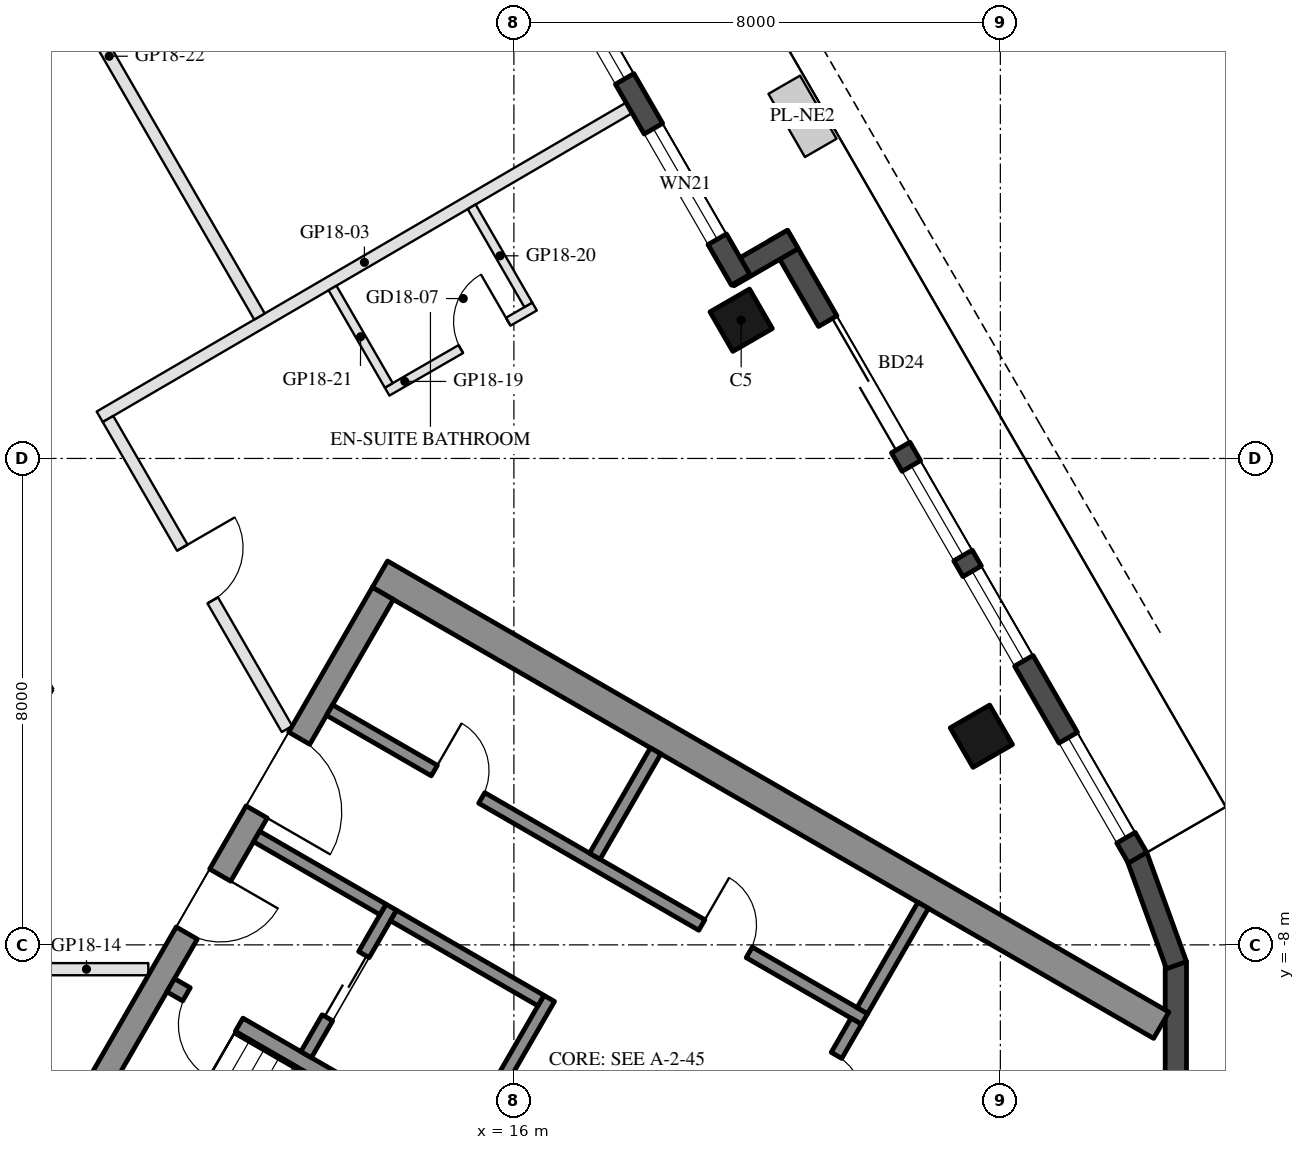
"""IFC4 building model, lengths in metres.
Left out: names, types, materials, properties, quantities, classifications, styles, units other than length and angle.
Written with IfcOpenShell. Run it as: python <this file> out.ifc"""

import sys

from ifc_helpers import new_model, si_unit, direction, frame, frame_2d, origin, origin_2d, place, context, subcontext, project, spatial, rectangle, hollow_rectangle, extrude, element, fill, save


model = new_model("IFC4")
c1 = context("Model", 3, precision=1e-05, world=origin(), true_north=direction((0.0, 1.0)))
c2 = subcontext(c1, "Body", "Model", "MODEL_VIEW")
j1 = project(units=[si_unit("LENGTHUNIT", "METRE"), si_unit("PLANEANGLEUNIT", "RADIAN")], contexts=[c1])
p1 = place(None, origin())
s1 = spatial("IfcSite", under=j1, at=p1, CompositionType="ELEMENT")
p2 = place(p1, origin())
s2 = spatial("IfcBuilding", under=s1, at=p2, CompositionType="ELEMENT")
p3 = place(p2, frame((0.0, 0.0, 191.0)))
s3 = spatial("IfcBuildingStorey", under=s2, at=p3, CompositionType="ELEMENT", Elevation=191.0)
for number, where, z_axis, x_axis in (
    (1, (23.688, -4.568, 0.0), (0.0, 0.0, 1.0), (-0.5, 0.866, 0.0)),
    (2, (19.738, 2.273, 0.0), (0.0, 0.0, 1.0), (-0.5, 0.866, 0.0)),
):
    element("IfcColumn", number, at=place(p3, frame(where, z_axis=z_axis, x_axis=x_axis)), inside=s3, PredefinedType="COLUMN", context=c2, shape_type="SweptSolid", body=[
        extrude(hollow_rectangle(XDim=0.75, YDim=0.75, WallThickness=0.035, at=origin_2d()), origin(), (0.0, 0.0, 1.0), 3.7),
    ])
for number, where, z_axis, x_axis in (
    (3, (26.244, -11.92, 0.0), (0.0, 0.0, 1.0), (0.342, 0.94, 0.0)),
    (4, (26.886, -10.185, 0.0), (0.0, 0.0, 1.0), (0.0, 1.0, 0.0)),
    (5, (26.897, -8.335, 0.0), (0.0, 0.0, 1.0), (-0.342, 0.94, 0.0)),
):
    element("IfcWall", number, at=place(p3, frame(where, z_axis=z_axis, x_axis=x_axis)), inside=s3, PredefinedType="SOLIDWALL", context=c2, shape_type="SweptSolid", body=[
        extrude(rectangle(XDim=1.91, YDim=0.35, at=frame_2d((0.955, 0.0))), origin(), (0.0, 0.0, 1.0), 3.55),
    ])
p4 = place(p3, frame((26.257, -6.567, 0.0), z_axis=(0.0, 0.0, 1.0), x_axis=(-0.500023526245, 0.866011820475, 0.0)))
e6 = element("IfcWall", 6, at=p4, inside=s3, PredefinedType="SOLIDWALL", context=c2, shape_type="SweptSolid", body=[
    extrude(rectangle(XDim=11.816, YDim=0.35, at=frame_2d((5.908, 0.0))), origin(), (0.0, 0.0, 1.0), 3.55),
])
p5 = place(p4, frame((0.38, 0.0, 0.3)))
e7 = element("IfcOpeningElement", 7, at=p5, cuts=e6, PredefinedType="OPENING", context=c2, shape_type="SweptSolid", body=[
    extrude(rectangle(XDim=1.9, YDim=2.65, at=frame_2d((0.95, 1.325))), frame((0.0, 0.185, 0.0), z_axis=(0.0, -1.0, 0.0), x_axis=(1.0, 0.0, 0.0)), (0.0, 0.0, 1.0), 0.37),
])
p6 = place(p4, frame((7.791, 0.0, 0.0)))
e8 = element("IfcOpeningElement", 8, at=p6, cuts=e6, PredefinedType="OPENING", context=c2, shape_type="SweptSolid", body=[
    extrude(rectangle(XDim=2.4, YDim=2.4, at=frame_2d((1.2, 1.2))), frame((0.0, 0.185, 0.0), z_axis=(0.0, -1.0, 0.0), x_axis=(1.0, 0.0, 0.0)), (0.0, 0.0, 1.0), 0.37),
])
p7 = place(p4, frame((3.741, 0.0, 0.3)))
e9 = element("IfcOpeningElement", 9, at=p7, cuts=e6, PredefinedType="OPENING", context=c2, shape_type="SweptSolid", body=[
    extrude(rectangle(XDim=1.7, YDim=2.65, at=frame_2d((0.85, 1.325))), frame((0.0, 0.185, 0.0), z_axis=(0.0, -1.0, 0.0), x_axis=(1.0, 0.0, 0.0)), (0.0, 0.0, 1.0), 0.37),
])
p8 = place(p4, frame((5.741, 0.0, 0.3)))
e10 = element("IfcOpeningElement", 10, at=p8, cuts=e6, PredefinedType="OPENING", context=c2, shape_type="SweptSolid", body=[
    extrude(rectangle(XDim=1.7, YDim=2.65, at=frame_2d((0.85, 1.325))), frame((0.0, 0.185, 0.0), z_axis=(0.0, -1.0, 0.0), x_axis=(1.0, 0.0, 0.0)), (0.0, 0.0, 1.0), 0.37),
])
p9 = place(p3, frame((20.588, 3.601, 0.0), z_axis=(0.0, 0.0, 1.0), x_axis=(-0.866005645448, -0.500034220881, 0.0)))
e11 = element("IfcWall", 11, at=p9, inside=s3, PredefinedType="SOLIDWALL", context=c2, shape_type="SweptSolid", body=[
    extrude(rectangle(XDim=1.22, YDim=0.35, at=frame_2d((0.61, 0.0))), origin(), (0.0, 0.0, 1.0), 3.55),
])
p10 = place(p3, frame((19.729, 2.938, 0.0), z_axis=(0.0, 0.0, 1.0), x_axis=(-0.499976430342, 0.866039011305, 0.0)))
e12 = element("IfcWall", 12, at=p10, inside=s3, PredefinedType="SOLIDWALL", context=c2, shape_type="SweptSolid", body=[
    extrude(rectangle(XDim=6.74, YDim=0.35, at=frame_2d((3.37, 0.0))), origin(), (0.0, 0.0, 1.0), 3.55),
])
p11 = place(p10, frame((0.77, 0.0, 0.3)))
e13 = element("IfcOpeningElement", 13, at=p11, cuts=e12, PredefinedType="OPENING", context=c2, shape_type="SweptSolid", body=[
    extrude(rectangle(XDim=2.1, YDim=2.65, at=frame_2d((1.05, 1.325))), frame((0.0, 0.185, 0.0), z_axis=(0.0, -1.0, 0.0), x_axis=(1.0, 0.0, 0.0)), (0.0, 0.0, 1.0), 0.37),
])
p12 = place(p10, frame((3.815, 0.0, 0.3)))
e14 = element("IfcOpeningElement", 14, at=p12, cuts=e12, PredefinedType="OPENING", context=c2, shape_type="SweptSolid", body=[
    extrude(rectangle(XDim=2.1, YDim=2.65, at=frame_2d((1.05, 1.325))), frame((0.0, 0.185, 0.0), z_axis=(0.0, -1.0, 0.0), x_axis=(1.0, 0.0, 0.0)), (0.0, 0.0, 1.0), 0.37),
])
p13 = place(p3, frame((13.797, -1.903, 0.0), z_axis=(0.0, 0.0, 1.0), x_axis=(0.866025009528, -0.500000682871, 0.0)))
e15 = element("IfcWall", 15, at=p13, inside=s3, PredefinedType="SHEAR", context=c2, shape_type="SweptSolid", body=[
    extrude(rectangle(XDim=14.837, YDim=0.5, at=frame_2d((7.418, 0.0))), origin(), (0.0, 0.0, 1.0), 3.5),
])
p14 = place(p3, frame((8.845, -10.88, 0.0), z_axis=(0.0, 0.0, 1.0), x_axis=(0.500004234368, 0.866022959057, 0.0)))
e16 = element("IfcWall", 16, at=p14, inside=s3, PredefinedType="SHEAR", context=c2, shape_type="SweptSolid", body=[
    extrude(rectangle(XDim=10.0, YDim=0.4, at=frame_2d((5.0, 0.0))), origin(), (0.0, 0.0, 1.0), 3.5),
])
p15 = place(p14, frame((3.55, 0.0, 0.0)))
e17 = element("IfcOpeningElement", 17, at=p15, cuts=e16, PredefinedType="OPENING", context=c2, shape_type="SweptSolid", body=[
    extrude(rectangle(XDim=1.1, YDim=2.1, at=frame_2d((0.55, 1.05))), frame((0.0, 0.21, 0.0), z_axis=(0.0, -1.0, 0.0), x_axis=(1.0, 0.0, 0.0)), (0.0, 0.0, 1.0), 0.42),
])
p16 = place(p14, frame((5.85, 0.0, 0.0)))
e18 = element("IfcOpeningElement", 18, at=p16, cuts=e16, PredefinedType="OPENING", context=c2, shape_type="SweptSolid", body=[
    extrude(rectangle(XDim=1.4, YDim=2.1, at=frame_2d((0.7, 1.05))), frame((0.0, 0.21, 0.0), z_axis=(0.0, -1.0, 0.0), x_axis=(1.0, 0.0, 0.0)), (0.0, 0.0, 1.0), 0.42),
])
p17 = place(p3, frame((10.356, -8.664, 0.0), z_axis=(0.0, 0.0, 1.0), x_axis=(0.866028629588, -0.499994412703, 0.0)))
e19 = element("IfcWall", 19, at=p17, inside=s3, PredefinedType="SHEAR", context=c2, shape_type="SweptSolid", body=[
    extrude(rectangle(XDim=6.45, YDim=0.25, at=frame_2d((3.225, 0.0))), origin(), (0.0, 0.0, 1.0), 3.5),
])
p18 = place(p17, frame((0.3, 0.0, 0.0)))
e20 = element("IfcOpeningElement", 20, at=p18, cuts=e19, PredefinedType="OPENING", context=c2, shape_type="SweptSolid", body=[
    extrude(rectangle(XDim=1.0, YDim=2.1, at=frame_2d((0.5, 1.05))), frame((0.0, 0.135, 0.0), z_axis=(0.0, -1.0, 0.0), x_axis=(1.0, 0.0, 0.0)), (0.0, 0.0, 1.0), 0.27),
])
p19 = place(p3, frame((15.181, -11.305, 0.0), z_axis=(0.0, 0.0, 1.0), x_axis=(0.49994636267, 0.866056369097, 0.0)))
e21 = element("IfcWall", 21, at=p19, inside=s3, PredefinedType="SHEAR", context=c2, shape_type="SweptSolid", body=[
    extrude(rectangle(XDim=2.8, YDim=0.2, at=frame_2d((1.4, 0.0))), origin(), (0.0, 0.0, 1.0), 3.5),
])
p20 = place(p3, frame((12.583, -9.805, 0.0), z_axis=(0.0, 0.0, 1.0), x_axis=(0.49994636267, 0.866056369097, 0.0)))
e22 = element("IfcWall", 22, at=p20, inside=s3, PredefinedType="SHEAR", context=c2, shape_type="SweptSolid", body=[
    extrude(rectangle(XDim=2.8, YDim=0.2, at=frame_2d((1.4, 0.0))), origin(), (0.0, 0.0, 1.0), 3.5),
])
p21 = place(p20, frame((0.7, 0.0, 0.0)))
e23 = element("IfcOpeningElement", 23, at=p21, cuts=e22, PredefinedType="OPENING", context=c2, shape_type="SweptSolid", body=[
    extrude(rectangle(XDim=1.2, YDim=2.1, at=frame_2d((0.6, 1.05))), frame((0.0, 0.11, 0.0), z_axis=(0.0, -1.0, 0.0), x_axis=(1.0, 0.0, 0.0)), (0.0, 0.0, 1.0), 0.22),
])
p22 = place(p3, frame((11.768, -6.217, 0.0), z_axis=(0.0, 0.0, 1.0), x_axis=(0.866050077142, -0.499957262057, 0.0)))
e24 = element("IfcWall", 24, at=p22, inside=s3, PredefinedType="SHEAR", context=c2, shape_type="SweptSolid", body=[
    extrude(rectangle(XDim=2.4, YDim=0.2, at=frame_2d((1.2, 0.0))), origin(), (0.0, 0.0, 1.0), 3.5),
])
p23 = place(p3, frame((14.02, -7.517, 0.0), z_axis=(0.0, 0.0, 1.0), x_axis=(0.866034573852, -0.49998411664, 0.0)))
e25 = element("IfcWall", 25, at=p23, inside=s3, PredefinedType="SHEAR", context=c2, shape_type="SweptSolid", body=[
    extrude(rectangle(XDim=2.8, YDim=0.2, at=frame_2d((1.4, 0.0))), origin(), (0.0, 0.0, 1.0), 3.5),
])
p24 = place(p3, frame((12.968, -4.138, 0.0), z_axis=(0.0, 0.0, 1.0), x_axis=(0.866028328073, -0.49999493495, 0.0)))
e26 = element("IfcWall", 26, at=p24, inside=s3, PredefinedType="SHEAR", context=c2, shape_type="SweptSolid", body=[
    extrude(rectangle(XDim=10.16, YDim=0.2, at=frame_2d((5.08, 0.0))), origin(), (0.0, 0.0, 1.0), 3.5),
])
p25 = place(p24, frame((1.99, 0.0, 0.0)))
e27 = element("IfcOpeningElement", 27, at=p25, cuts=e26, PredefinedType="OPENING", context=c2, shape_type="SweptSolid", body=[
    extrude(rectangle(XDim=0.9, YDim=2.1, at=frame_2d((0.45, 1.05))), frame((0.0, 0.11, 0.0), z_axis=(0.0, -1.0, 0.0), x_axis=(1.0, 0.0, 0.0)), (0.0, 0.0, 1.0), 0.22),
])
p26 = place(p24, frame((7.07, 0.0, 0.0)))
e28 = element("IfcOpeningElement", 28, at=p26, cuts=e26, PredefinedType="OPENING", context=c2, shape_type="SweptSolid", body=[
    extrude(rectangle(XDim=0.9, YDim=2.1, at=frame_2d((0.45, 1.05))), frame((0.0, 0.11, 0.0), z_axis=(0.0, -1.0, 0.0), x_axis=(1.0, 0.0, 0.0)), (0.0, 0.0, 1.0), 0.22),
])
p27 = place(p3, frame((20.43, -11.333, 0.0), z_axis=(0.0, 0.0, 1.0), x_axis=(0.500001309137, 0.866024647952, 0.0)))
e29 = element("IfcWall", 29, at=p27, inside=s3, PredefinedType="SHEAR", context=c2, shape_type="SweptSolid", body=[
    extrude(rectangle(XDim=2.4, YDim=0.2, at=frame_2d((1.2, 0.0))), origin(), (0.0, 0.0, 1.0), 3.5),
])
p28 = place(p27, frame((0.85, 0.0, 0.0)))
e30 = element("IfcOpeningElement", 30, at=p28, cuts=e29, PredefinedType="OPENING", context=c2, shape_type="SweptSolid", body=[
    extrude(rectangle(XDim=0.9, YDim=2.1, at=frame_2d((0.45, 1.05))), frame((0.0, 0.11, 0.0), z_axis=(0.0, -1.0, 0.0), x_axis=(1.0, 0.0, 0.0)), (0.0, 0.0, 1.0), 0.22),
])
for number, where, z_axis, x_axis in (
    (31, (17.331, -6.542, 0.0), (0.0, 0.0, 1.0), (0.5, 0.866, 0.0)),
    (32, (21.73, -9.082, 0.0), (0.0, 0.0, 1.0), (0.5, 0.866, 0.0)),
):
    element("IfcWall", number, at=place(p3, frame(where, z_axis=z_axis, x_axis=x_axis)), inside=s3, PredefinedType="SHEAR", context=c2, shape_type="SweptSolid", body=[
        extrude(rectangle(XDim=2.0, YDim=0.2, at=frame_2d((1.0, 0.0))), origin(), (0.0, 0.0, 1.0), 3.5),
    ])
p29 = place(p3, frame((17.895, 5.766, 0.0), z_axis=(0.0, 0.0, 1.0), x_axis=(-0.863697195261, -0.504011066246, 0.0)))
e33 = element("IfcWall", 33, at=p29, inside=s3, PredefinedType="PARTITIONING", context=c2, shape_type="SweptSolid", body=[
    extrude(rectangle(XDim=10.08, YDim=0.2, at=frame_2d((5.04, 0.0))), origin(), (0.0, 0.0, 1.0), 2.95),
])
p30 = place(p3, frame((9.988, -8.4, 0.0), z_axis=(0.0, 0.0, 1.0), x_axis=(-1.0, 0.0, 0.0)))
e34 = element("IfcWall", 34, at=p30, inside=s3, PredefinedType="PARTITIONING", context=c2, shape_type="SweptSolid", body=[
    extrude(rectangle(XDim=5.088, YDim=0.2, at=frame_2d((2.544, 0.0))), origin(), (0.0, 0.0, 1.0), 2.95),
])
p31 = place(p30, frame((2.044, 0.0, 0.0)))
e35 = element("IfcOpeningElement", 35, at=p31, cuts=e34, PredefinedType="OPENING", context=c2, shape_type="SweptSolid", body=[
    extrude(rectangle(XDim=1.0, YDim=2.1, at=frame_2d((0.5, 1.05))), frame((0.0, 0.11, 0.0), z_axis=(0.0, -1.0, 0.0), x_axis=(1.0, 0.0, 0.0)), (0.0, 0.0, 1.0), 0.22),
])
p32 = place(p3, frame((9.325, 0.649, 0.0), z_axis=(0.0, 0.0, 1.0), x_axis=(0.500032331163, -0.866006736574, 0.0)))
e36 = element("IfcWall", 36, at=p32, inside=s3, PredefinedType="PARTITIONING", context=c2, shape_type="SweptSolid", body=[
    extrude(rectangle(XDim=5.888, YDim=0.2, at=frame_2d((2.944, 0.0))), origin(), (0.0, 0.0, 1.0), 2.95),
])
p33 = place(p32, frame((2.444, 0.0, 0.0)))
e37 = element("IfcOpeningElement", 37, at=p33, cuts=e36, PredefinedType="OPENING", context=c2, shape_type="SweptSolid", body=[
    extrude(rectangle(XDim=1.0, YDim=2.1, at=frame_2d((0.5, 1.05))), frame((0.0, 0.11, 0.0), z_axis=(0.0, -1.0, 0.0), x_axis=(1.0, 0.0, 0.0)), (0.0, 0.0, 1.0), 0.22),
])
p34 = place(p3, frame((13.915, 1.099, 0.0), z_axis=(0.0, 0.0, 1.0), x_axis=(0.866018616679, 0.500011755427, 0.0)))
e38 = element("IfcWall", 38, at=p34, inside=s3, PredefinedType="PARTITIONING", context=c2, shape_type="SweptSolid", body=[
    extrude(rectangle(XDim=2.8, YDim=0.15, at=frame_2d((1.4, 0.0))), origin(), (0.0, 0.0, 1.0), 3.55),
])
p35 = place(p34, frame((1.4, 0.0, 0.0)))
e39 = element("IfcOpeningElement", 39, at=p35, cuts=e38, PredefinedType="OPENING", context=c2, shape_type="SweptSolid", body=[
    extrude(rectangle(XDim=0.9, YDim=2.1, at=frame_2d((0.45, 1.05))), frame((0.0, 0.085, 0.0), z_axis=(0.0, -1.0, 0.0), x_axis=(1.0, 0.0, 0.0)), (0.0, 0.0, 1.0), 0.17),
])
p36 = place(p3, frame((16.237, 2.526, 0.0), z_axis=(0.0, 0.0, 1.0), x_axis=(-0.500043919151, 0.866000045566, 0.0)))
e40 = element("IfcWall", 40, at=p36, inside=s3, PredefinedType="PARTITIONING", context=c2, shape_type="SweptSolid", body=[
    extrude(rectangle(XDim=1.863, YDim=0.15, at=frame_2d((0.931, 0.0))), origin(), (0.0, 0.0, 1.0), 3.55),
])
p37 = place(p3, frame((13.942, 1.201, 0.0), z_axis=(0.0, 0.0, 1.0), x_axis=(-0.500026996568, 0.866009816748, 0.0)))
e41 = element("IfcWall", 41, at=p37, inside=s3, PredefinedType="PARTITIONING", context=c2, shape_type="SweptSolid", body=[
    extrude(rectangle(XDim=1.851, YDim=0.15, at=frame_2d((0.925, 0.0))), origin(), (0.0, 0.0, 1.0), 3.55),
])
p38 = place(p3, frame((6.873, 10.896, 0.0), z_axis=(0.0, 0.0, 1.0), x_axis=(0.499987518031, -0.866032610133, 0.0)))
e42 = element("IfcWall", 42, at=p38, inside=s3, PredefinedType="PARTITIONING", context=c2, shape_type="SweptSolid", body=[
    extrude(rectangle(XDim=9.886, YDim=0.2, at=frame_2d((4.943, 0.0))), origin(), (0.0, 0.0, 1.0), 2.95),
])
p39 = place(p38, frame((2.45, 0.0, 0.0)))
e43 = element("IfcOpeningElement", 43, at=p39, cuts=e42, PredefinedType="OPENING", context=c2, shape_type="SweptSolid", body=[
    extrude(rectangle(XDim=1.0, YDim=2.1, at=frame_2d((0.5, 1.05))), frame((0.0, 0.11, 0.0), z_axis=(0.0, -1.0, 0.0), x_axis=(1.0, 0.0, 0.0)), (0.0, 0.0, 1.0), 0.22),
])
p40 = place(p5, origin())
e44 = element("IfcWindow", 44, at=p40, inside=s3, PartitioningType="SINGLE_PANEL", PredefinedType="WINDOW", context=c2, shape_type="SweptSolid", body=[
    extrude(rectangle(XDim=1.9, YDim=2.65, at=frame_2d((0.95, 1.325))), frame((0.0, 0.03, 0.0), z_axis=(0.0, -1.0, 0.0), x_axis=(1.0, 0.0, 0.0)), (0.0, 0.0, 1.0), 0.06),
])
fill(e7, e44)
p41 = place(p6, frame((2.4, 0.0, 0.0), z_axis=(0.0, 0.0, 1.0), x_axis=(-1.0, 0.0, 0.0)))
e45 = element("IfcDoor", 45, at=p41, inside=s3, OperationType="SLIDING_TO_LEFT", PredefinedType="DOOR", context=c2, shape_type="SweptSolid", body=[
    extrude(rectangle(XDim=2.4, YDim=2.4, at=frame_2d((1.2, 1.2))), frame((0.0, 0.025, 0.0), z_axis=(0.0, -1.0, 0.0), x_axis=(1.0, 0.0, 0.0)), (0.0, 0.0, 1.0), 0.05),
])
fill(e8, e45)
p42 = place(p7, origin())
e46 = element("IfcWindow", 46, at=p42, inside=s3, PartitioningType="SINGLE_PANEL", PredefinedType="WINDOW", context=c2, shape_type="SweptSolid", body=[
    extrude(rectangle(XDim=1.7, YDim=2.65, at=frame_2d((0.85, 1.325))), frame((0.0, 0.03, 0.0), z_axis=(0.0, -1.0, 0.0), x_axis=(1.0, 0.0, 0.0)), (0.0, 0.0, 1.0), 0.06),
])
fill(e9, e46)
p43 = place(p8, origin())
e47 = element("IfcWindow", 47, at=p43, inside=s3, PartitioningType="SINGLE_PANEL", PredefinedType="WINDOW", context=c2, shape_type="SweptSolid", body=[
    extrude(rectangle(XDim=1.7, YDim=2.65, at=frame_2d((0.85, 1.325))), frame((0.0, 0.03, 0.0), z_axis=(0.0, -1.0, 0.0), x_axis=(1.0, 0.0, 0.0)), (0.0, 0.0, 1.0), 0.06),
])
fill(e10, e47)
p44 = place(p11, origin())
e48 = element("IfcWindow", 48, at=p44, inside=s3, PartitioningType="SINGLE_PANEL", PredefinedType="WINDOW", context=c2, shape_type="SweptSolid", body=[
    extrude(rectangle(XDim=2.1, YDim=2.65, at=frame_2d((1.05, 1.325))), frame((0.0, 0.03, 0.0), z_axis=(0.0, -1.0, 0.0), x_axis=(1.0, 0.0, 0.0)), (0.0, 0.0, 1.0), 0.06),
])
fill(e13, e48)
p45 = place(p12, origin())
e49 = element("IfcWindow", 49, at=p45, inside=s3, PartitioningType="SINGLE_PANEL", PredefinedType="WINDOW", context=c2, shape_type="SweptSolid", body=[
    extrude(rectangle(XDim=2.1, YDim=2.65, at=frame_2d((1.05, 1.325))), frame((0.0, 0.03, 0.0), z_axis=(0.0, -1.0, 0.0), x_axis=(1.0, 0.0, 0.0)), (0.0, 0.0, 1.0), 0.06),
])
fill(e14, e49)
p46 = place(p21, origin())
e50 = element("IfcDoor", 50, at=p46, inside=s3, OperationType="DOUBLE_DOOR_SLIDING", PredefinedType="DOOR", context=c2, shape_type="SweptSolid", body=[
    extrude(rectangle(XDim=1.2, YDim=2.1, at=frame_2d((0.6, 1.05))), frame((0.0, 0.025, 0.0), z_axis=(0.0, -1.0, 0.0), x_axis=(1.0, 0.0, 0.0)), (0.0, 0.0, 1.0), 0.05),
])
fill(e23, e50)
p47 = place(p25, origin())
e51 = element("IfcDoor", 51, at=p47, inside=s3, OperationType="SINGLE_SWING_LEFT", PredefinedType="DOOR", context=c2, shape_type="SweptSolid", body=[
    extrude(rectangle(XDim=0.9, YDim=2.1, at=frame_2d((0.45, 1.05))), frame((0.0, 0.025, 0.0), z_axis=(0.0, -1.0, 0.0), x_axis=(1.0, 0.0, 0.0)), (0.0, 0.0, 1.0), 0.05),
])
fill(e27, e51)
p48 = place(p26, origin())
e52 = element("IfcDoor", 52, at=p48, inside=s3, OperationType="SINGLE_SWING_LEFT", PredefinedType="DOOR", context=c2, shape_type="SweptSolid", body=[
    extrude(rectangle(XDim=0.9, YDim=2.1, at=frame_2d((0.45, 1.05))), frame((0.0, 0.025, 0.0), z_axis=(0.0, -1.0, 0.0), x_axis=(1.0, 0.0, 0.0)), (0.0, 0.0, 1.0), 0.05),
])
fill(e28, e52)
p49 = place(p28, frame((0.9, 0.0, 0.0), z_axis=(0.0, 0.0, 1.0), x_axis=(-1.0, 0.0, 0.0)))
e53 = element("IfcDoor", 53, at=p49, inside=s3, OperationType="SINGLE_SWING_RIGHT", PredefinedType="DOOR", context=c2, shape_type="SweptSolid", body=[
    extrude(rectangle(XDim=0.9, YDim=2.1, at=frame_2d((0.45, 1.05))), frame((0.0, 0.025, 0.0), z_axis=(0.0, -1.0, 0.0), x_axis=(1.0, 0.0, 0.0)), (0.0, 0.0, 1.0), 0.05),
])
fill(e30, e53)
p50 = place(p15, frame((1.1, 0.0, 0.0), z_axis=(0.0, 0.0, 1.0), x_axis=(-1.0, 0.0, 0.0)))
e54 = element("IfcDoor", 54, at=p50, inside=s3, OperationType="SINGLE_SWING_LEFT", PredefinedType="DOOR", context=c2, shape_type="SweptSolid", body=[
    extrude(rectangle(XDim=1.1, YDim=2.1, at=frame_2d((0.55, 1.05))), frame((0.0, 0.025, 0.0), z_axis=(0.0, -1.0, 0.0), x_axis=(1.0, 0.0, 0.0)), (0.0, 0.0, 1.0), 0.05),
])
fill(e17, e54)
p51 = place(p16, frame((1.4, 0.0, 0.0), z_axis=(0.0, 0.0, 1.0), x_axis=(-1.0, 0.0, 0.0)))
e55 = element("IfcDoor", 55, at=p51, inside=s3, OperationType="DOUBLE_DOOR_SINGLE_SWING", PredefinedType="DOOR", context=c2, shape_type="SweptSolid", body=[
    extrude(rectangle(XDim=1.4, YDim=2.1, at=frame_2d((0.7, 1.05))), frame((0.0, 0.025, 0.0), z_axis=(0.0, -1.0, 0.0), x_axis=(1.0, 0.0, 0.0)), (0.0, 0.0, 1.0), 0.05),
])
fill(e18, e55)
p52 = place(p18, frame((1.0, 0.0, 0.0), z_axis=(0.0, 0.0, 1.0), x_axis=(-1.0, 0.0, 0.0)))
e56 = element("IfcDoor", 56, at=p52, inside=s3, OperationType="SINGLE_SWING_LEFT", PredefinedType="DOOR", context=c2, shape_type="SweptSolid", body=[
    extrude(rectangle(XDim=1.0, YDim=2.1, at=frame_2d((0.5, 1.05))), frame((0.0, 0.025, 0.0), z_axis=(0.0, -1.0, 0.0), x_axis=(1.0, 0.0, 0.0)), (0.0, 0.0, 1.0), 0.05),
])
fill(e20, e56)
p53 = place(p35, origin())
e57 = element("IfcDoor", 57, at=p53, inside=s3, OperationType="SINGLE_SWING_RIGHT", PredefinedType="DOOR", context=c2, shape_type="SweptSolid", body=[
    extrude(rectangle(XDim=0.9, YDim=2.1, at=frame_2d((0.45, 1.05))), frame((0.0, 0.025, 0.0), z_axis=(0.0, -1.0, 0.0), x_axis=(1.0, 0.0, 0.0)), (0.0, 0.0, 1.0), 0.05),
])
fill(e39, e57)
p54 = place(p33, origin())
e58 = element("IfcDoor", 58, at=p54, inside=s3, OperationType="SINGLE_SWING_LEFT", PredefinedType="DOOR", context=c2, shape_type="SweptSolid", body=[
    extrude(rectangle(XDim=1.0, YDim=2.1, at=frame_2d((0.5, 1.05))), frame((0.0, 0.025, 0.0), z_axis=(0.0, -1.0, 0.0), x_axis=(1.0, 0.0, 0.0)), (0.0, 0.0, 1.0), 0.05),
])
fill(e37, e58)
save(model, sys.argv[1])
